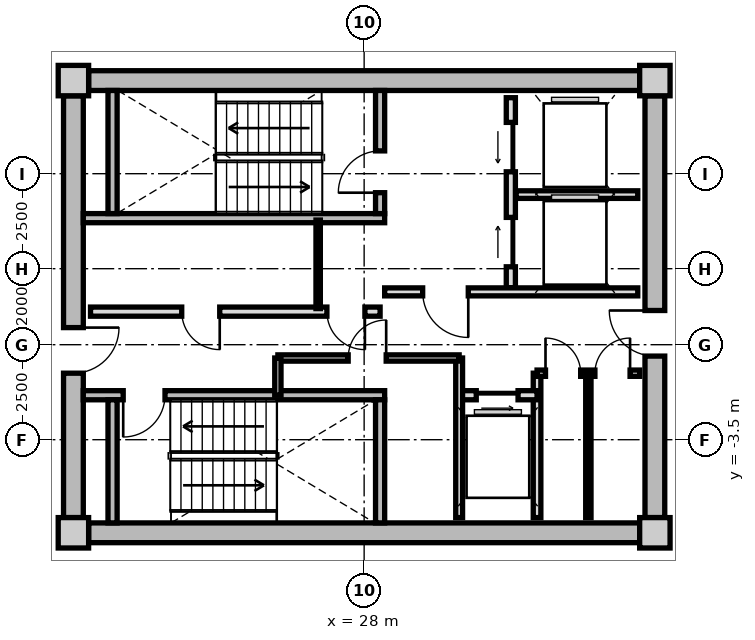
"""IFC4 building model, lengths in metres.
Left out: names, types, materials, properties, quantities, classifications, styles, units other than length and angle.
Written with IfcOpenShell. Run it as: python <this file> out.ifc"""

import sys

from ifc_helpers import new_model, si_unit, direction, frame, frame_2d, origin, origin_2d, place, context, subcontext, project, spatial, rectangle, extrude, source, transform, mapped, element, fill, save


model = new_model("IFC4")
c1 = context("Model", 3, precision=1e-05, world=origin(), true_north=direction((0.0, 1.0)))
c2 = subcontext(c1, "Body", "Model", "MODEL_VIEW")
j1 = project(units=[si_unit("LENGTHUNIT", "METRE"), si_unit("PLANEANGLEUNIT", "RADIAN")], contexts=[c1])
p1 = place(None, origin())
s1 = spatial("IfcSite", under=j1, at=p1, CompositionType="ELEMENT")
p2 = place(p1, origin())
s2 = spatial("IfcBuilding", under=s1, at=p2, CompositionType="ELEMENT")
p3 = place(p2, frame((0.0, 0.0, 203.8)))
s3 = spatial("IfcBuildingStorey", under=s2, at=p3, CompositionType="ELEMENT", Elevation=203.8)
m1 = source(origin(), c2, "Body", "SweptSolid", [
    extrude(rectangle(XDim=0.8, YDim=0.8, at=origin_2d()), origin(), (0.0, 0.0, 1.0), 4.0),
])
for number, where, z_axis, x_axis in (
    (1, (20.35, -5.95, 0.0), (0.0, 0.0, 1.0), (1.0, 0.0, 0.0)),
    (2, (35.65, -5.95, 0.0), (0.0, 0.0, 1.0), (1.0, 0.0, 0.0)),
    (3, (35.65, 5.95, 0.0), (0.0, 0.0, 1.0), (1.0, 0.0, 0.0)),
    (4, (20.35, 5.95, 0.0), (0.0, 0.0, 1.0), (1.0, 0.0, 0.0)),
):
    element("IfcColumn", number, at=place(p3, frame(where, z_axis=z_axis, x_axis=x_axis)), inside=s3, PredefinedType="COLUMN", context=c2, shape_type="MappedRepresentation", body=[
        mapped(m1, transform((0.0, 0.0, 0.0), x_axis=(1.0, 0.0, 0.0), y_axis=(0.0, 1.0, 0.0), z_axis=(0.0, 0.0, 1.0), scale=1.0)),
    ])
m2 = source(origin(), c2, "Body", "SweptSolid", [
    extrude(rectangle(XDim=14.5, YDim=0.52, at=frame_2d((7.25, 0.0))), origin(), (0.0, 0.0, 1.0), 3.71),
])
for number, where, z_axis, x_axis in (
    (5, (20.75, 5.95, 0.0), (0.0, 0.0, 1.0), (1.0, 0.0, 0.0)),
    (6, (35.25, -5.95, 0.0), (0.0, 0.0, 1.0), (-1.0, 0.0, 0.0)),
):
    element("IfcWall", number, at=place(p3, frame(where, z_axis=z_axis, x_axis=x_axis)), inside=s3, PredefinedType="SHEAR", context=c2, shape_type="MappedRepresentation", body=[
        mapped(m2, transform((0.0, 0.0, 0.0), x_axis=(1.0, 0.0, 0.0), y_axis=(0.0, 1.0, 0.0), z_axis=(0.0, 0.0, 1.0), scale=1.0)),
    ])
m3 = source(origin(), c2, "Body", "SweptSolid", [
    extrude(rectangle(XDim=11.1, YDim=0.52, at=frame_2d((5.55, 0.0))), origin(), (0.0, 0.0, 1.0), 3.71),
])
p4 = place(p3, frame((20.35, -5.55, 0.0), z_axis=(0.0, 0.0, 1.0), x_axis=(0.0, 1.0, 0.0)))
e7 = element("IfcWall", 7, at=p4, inside=s3, PredefinedType="SHEAR", context=c2, shape_type="MappedRepresentation", body=[
    mapped(m3, transform((0.0, 0.0, 0.0), x_axis=(1.0, 0.0, 0.0), y_axis=(0.0, 1.0, 0.0), z_axis=(0.0, 0.0, 1.0), scale=1.0)),
])
p5 = place(p4, frame((3.8, 0.0, 0.0)))
e8 = element("IfcOpeningElement", 8, at=p5, cuts=e7, PredefinedType="OPENING", context=c2, shape_type="SweptSolid", body=[
    extrude(rectangle(XDim=1.2, YDim=2.15, at=frame_2d((0.6, 1.075))), frame((0.0, 0.27, 0.0), z_axis=(0.0, -1.0, 0.0), x_axis=(1.0, 0.0, 0.0)), (0.0, 0.0, 1.0), 0.54),
])
p6 = place(p3, frame((35.65, 5.55, 0.0), z_axis=(0.0, 0.0, 1.0), x_axis=(0.0, -1.0, 0.0)))
e9 = element("IfcWall", 9, at=p6, inside=s3, PredefinedType="SHEAR", context=c2, shape_type="MappedRepresentation", body=[
    mapped(m3, transform((0.0, 0.0, 0.0), x_axis=(1.0, 0.0, 0.0), y_axis=(0.0, 1.0, 0.0), z_axis=(0.0, 0.0, 1.0), scale=1.0)),
])
p7 = place(p6, frame((5.65, 0.0, 0.0)))
e10 = element("IfcOpeningElement", 10, at=p7, cuts=e9, PredefinedType="OPENING", context=c2, shape_type="SweptSolid", body=[
    extrude(rectangle(XDim=1.2, YDim=2.15, at=frame_2d((0.6, 1.075))), frame((0.0, 0.27, 0.0), z_axis=(0.0, -1.0, 0.0), x_axis=(1.0, 0.0, 0.0)), (0.0, 0.0, 1.0), 0.54),
])
m4 = source(origin(), c2, "Body", "SweptSolid", [
    extrude(rectangle(XDim=7.93, YDim=0.24, at=frame_2d((3.965, 0.0))), origin(), (0.0, 0.0, 1.0), 3.71),
])
p8 = place(p3, frame((20.61, 2.33, 0.0), z_axis=(0.0, 0.0, 1.0), x_axis=(1.0, 0.0, 0.0)))
e11 = element("IfcWall", 11, at=p8, inside=s3, PredefinedType="PARTITIONING", context=c2, shape_type="MappedRepresentation", body=[
    mapped(m4, transform((0.0, 0.0, 0.0), x_axis=(1.0, 0.0, 0.0), y_axis=(0.0, 1.0, 0.0), z_axis=(0.0, 0.0, 1.0), scale=1.0)),
])
m5 = source(origin(), c2, "Body", "SweptSolid", [
    extrude(rectangle(XDim=3.24, YDim=0.24, at=frame_2d((1.62, 0.0))), origin(), (0.0, 0.0, 1.0), 3.71),
])
p9 = place(p3, frame((21.38, 2.45, 0.0), z_axis=(0.0, 0.0, 1.0), x_axis=(0.0, 1.0, 0.0)))
e12 = element("IfcWall", 12, at=p9, inside=s3, PredefinedType="PARTITIONING", context=c2, shape_type="MappedRepresentation", body=[
    mapped(m5, transform((0.0, 0.0, 0.0), x_axis=(1.0, 0.0, 0.0), y_axis=(0.0, 1.0, 0.0), z_axis=(0.0, 0.0, 1.0), scale=1.0)),
])
p10 = place(p3, frame((28.42, 2.45, 0.0), z_axis=(0.0, 0.0, 1.0), x_axis=(0.0, 1.0, 0.0)))
e13 = element("IfcWall", 13, at=p10, inside=s3, PredefinedType="PARTITIONING", context=c2, shape_type="MappedRepresentation", body=[
    mapped(m5, transform((0.0, 0.0, 0.0), x_axis=(1.0, 0.0, 0.0), y_axis=(0.0, 1.0, 0.0), z_axis=(0.0, 0.0, 1.0), scale=1.0)),
])
p11 = place(p10, frame((0.55, 0.0, 0.0)))
e14 = element("IfcOpeningElement", 14, at=p11, cuts=e13, PredefinedType="OPENING", context=c2, shape_type="SweptSolid", body=[
    extrude(rectangle(XDim=1.1, YDim=2.15, at=frame_2d((0.55, 1.075))), frame((0.0, 0.13, 0.0), z_axis=(0.0, -1.0, 0.0), x_axis=(1.0, 0.0, 0.0)), (0.0, 0.0, 1.0), 0.26),
])
p12 = place(p3, frame((20.61, -2.33, 0.0), z_axis=(0.0, 0.0, 1.0), x_axis=(1.0, 0.0, 0.0)))
e15 = element("IfcWall", 15, at=p12, inside=s3, PredefinedType="PARTITIONING", context=c2, shape_type="MappedRepresentation", body=[
    mapped(m4, transform((0.0, 0.0, 0.0), x_axis=(1.0, 0.0, 0.0), y_axis=(0.0, 1.0, 0.0), z_axis=(0.0, 0.0, 1.0), scale=1.0)),
])
p13 = place(p12, frame((1.05, 0.0, 0.0)))
e16 = element("IfcOpeningElement", 16, at=p13, cuts=e15, PredefinedType="OPENING", context=c2, shape_type="SweptSolid", body=[
    extrude(rectangle(XDim=1.1, YDim=2.15, at=frame_2d((0.55, 1.075))), frame((0.0, 0.13, 0.0), z_axis=(0.0, -1.0, 0.0), x_axis=(1.0, 0.0, 0.0)), (0.0, 0.0, 1.0), 0.26),
])
for number, where, z_axis, x_axis in (
    (17, (21.38, -5.69, 0.0), (0.0, 0.0, 1.0), (0.0, 1.0, 0.0)),
    (18, (28.42, -5.69, 0.0), (0.0, 0.0, 1.0), (0.0, 1.0, 0.0)),
):
    element("IfcWall", number, at=place(p3, frame(where, z_axis=z_axis, x_axis=x_axis)), inside=s3, PredefinedType="PARTITIONING", context=c2, shape_type="MappedRepresentation", body=[
        mapped(m5, transform((0.0, 0.0, 0.0), x_axis=(1.0, 0.0, 0.0), y_axis=(0.0, 1.0, 0.0), z_axis=(0.0, 0.0, 1.0), scale=1.0)),
    ])
m6 = source(origin(), c2, "Body", "SweptSolid", [
    extrude(rectangle(XDim=5.0, YDim=0.24, at=frame_2d((2.5, 0.0))), origin(), (0.0, 0.0, 1.0), 3.695),
])
p14 = place(p3, frame((31.86, 0.5, 0.0), z_axis=(0.0, 0.0, 1.0), x_axis=(0.0, 1.0, 0.0)))
e19 = element("IfcWall", 19, at=p14, inside=s3, PredefinedType="PARTITIONING", context=c2, shape_type="MappedRepresentation", body=[
    mapped(m6, transform((0.0, 0.0, 0.0), x_axis=(1.0, 0.0, 0.0), y_axis=(0.0, 1.0, 0.0), z_axis=(0.0, 0.0, 1.0), scale=1.0)),
])
p15 = place(p14, frame((3.05, 0.0, 0.0)))
e20 = element("IfcOpeningElement", 20, at=p15, cuts=e19, PredefinedType="OPENING", context=c2, shape_type="SweptSolid", body=[
    extrude(rectangle(XDim=1.3, YDim=2.2, at=frame_2d((0.65, 1.1))), frame((0.0, 0.13, 0.0), z_axis=(0.0, -1.0, 0.0), x_axis=(1.0, 0.0, 0.0)), (0.0, 0.0, 1.0), 0.26),
])
p16 = place(p14, frame((0.55, 0.0, 0.0)))
e21 = element("IfcOpeningElement", 21, at=p16, cuts=e19, PredefinedType="OPENING", context=c2, shape_type="SweptSolid", body=[
    extrude(rectangle(XDim=1.3, YDim=2.2, at=frame_2d((0.65, 1.1))), frame((0.0, 0.13, 0.0), z_axis=(0.0, -1.0, 0.0), x_axis=(1.0, 0.0, 0.0)), (0.0, 0.0, 1.0), 0.26),
])
m7 = source(origin(), c2, "Body", "SweptSolid", [
    extrude(rectangle(XDim=3.2, YDim=0.2, at=frame_2d((1.6, 0.0))), origin(), (0.0, 0.0, 1.0), 3.695),
])
p17 = place(p3, frame((32.0, 2.95, 0.0), z_axis=(0.0, 0.0, 1.0), x_axis=(1.0, 0.0, 0.0)))
e22 = element("IfcWall", 22, at=p17, inside=s3, PredefinedType="PARTITIONING", context=c2, shape_type="MappedRepresentation", body=[
    mapped(m7, transform((0.0, 0.0, 0.0), x_axis=(1.0, 0.0, 0.0), y_axis=(0.0, 1.0, 0.0), z_axis=(0.0, 0.0, 1.0), scale=1.0)),
])
m8 = source(origin(), c2, "Body", "SweptSolid", [
    extrude(rectangle(XDim=6.66, YDim=0.21, at=frame_2d((3.33, 0.0))), origin(), (0.0, 0.0, 1.0), 3.695),
])
p18 = place(p3, frame((28.54, 0.39, 0.0), z_axis=(0.0, 0.0, 1.0), x_axis=(1.0, 0.0, 0.0)))
e23 = element("IfcWall", 23, at=p18, inside=s3, PredefinedType="PARTITIONING", context=c2, shape_type="MappedRepresentation", body=[
    mapped(m8, transform((0.0, 0.0, 0.0), x_axis=(1.0, 0.0, 0.0), y_axis=(0.0, 1.0, 0.0), z_axis=(0.0, 0.0, 1.0), scale=1.0)),
])
p19 = place(p18, frame((1.0, 0.0, 0.0)))
e24 = element("IfcOpeningElement", 24, at=p19, cuts=e23, PredefinedType="OPENING", context=c2, shape_type="SweptSolid", body=[
    extrude(rectangle(XDim=1.2, YDim=2.15, at=frame_2d((0.6, 1.075))), frame((0.0, 0.115, 0.0), z_axis=(0.0, -1.0, 0.0), x_axis=(1.0, 0.0, 0.0)), (0.0, 0.0, 1.0), 0.23),
])
m9 = source(origin(), c2, "Body", "SweptSolid", [
    extrude(rectangle(XDim=7.62, YDim=0.24, at=frame_2d((3.81, 0.0))), origin(), (0.0, 0.0, 1.0), 3.695),
])
p20 = place(p3, frame((20.8, -0.13, 0.0), z_axis=(0.0, 0.0, 1.0), x_axis=(1.0, 0.0, 0.0)))
e25 = element("IfcWall", 25, at=p20, inside=s3, PredefinedType="PARTITIONING", context=c2, shape_type="MappedRepresentation", body=[
    mapped(m9, transform((0.0, 0.0, 0.0), x_axis=(1.0, 0.0, 0.0), y_axis=(0.0, 1.0, 0.0), z_axis=(0.0, 0.0, 1.0), scale=1.0)),
])
p21 = place(p20, frame((6.22, 0.0, 0.0)))
e26 = element("IfcOpeningElement", 26, at=p21, cuts=e25, PredefinedType="OPENING", context=c2, shape_type="SweptSolid", body=[
    extrude(rectangle(XDim=1.0, YDim=2.1, at=frame_2d((0.5, 1.05))), frame((0.0, 0.13, 0.0), z_axis=(0.0, -1.0, 0.0), x_axis=(1.0, 0.0, 0.0)), (0.0, 0.0, 1.0), 0.26),
])
p22 = place(p20, frame((2.4, 0.0, 0.0)))
e27 = element("IfcOpeningElement", 27, at=p22, cuts=e25, PredefinedType="OPENING", context=c2, shape_type="SweptSolid", body=[
    extrude(rectangle(XDim=1.0, YDim=2.1, at=frame_2d((0.5, 1.05))), frame((0.0, 0.13, 0.0), z_axis=(0.0, -1.0, 0.0), x_axis=(1.0, 0.0, 0.0)), (0.0, 0.0, 1.0), 0.26),
])
m10 = source(origin(), c2, "Body", "SweptSolid", [
    extrude(rectangle(XDim=2.33, YDim=0.115, at=frame_2d((1.165, 0.0))), origin(), (0.0, 0.0, 1.0), 3.695),
])
p23 = place(p3, frame((26.79, -0.05, 0.0), z_axis=(0.0, 0.0, 1.0), x_axis=(0.0, 1.0, 0.0)))
e28 = element("IfcWall", 28, at=p23, inside=s3, PredefinedType="PARTITIONING", context=c2, shape_type="MappedRepresentation", body=[
    mapped(m10, transform((0.0, 0.0, 0.0), x_axis=(1.0, 0.0, 0.0), y_axis=(0.0, 1.0, 0.0), z_axis=(0.0, 0.0, 1.0), scale=1.0)),
])
m11 = source(origin(), c2, "Body", "SweptSolid", [
    extrude(rectangle(XDim=3.8, YDim=0.2, at=frame_2d((1.9, 0.0))), origin(), (0.0, 0.0, 1.0), 3.695),
])
p24 = place(p3, frame((32.55, -5.55, 0.0), z_axis=(0.0, 0.0, 1.0), x_axis=(0.0, 1.0, 0.0)))
e29 = element("IfcWall", 29, at=p24, inside=s3, PredefinedType="PARTITIONING", context=c2, shape_type="MappedRepresentation", body=[
    mapped(m11, transform((0.0, 0.0, 0.0), x_axis=(1.0, 0.0, 0.0), y_axis=(0.0, 1.0, 0.0), z_axis=(0.0, 0.0, 1.0), scale=1.0)),
])
m12 = source(origin(), c2, "Body", "SweptSolid", [
    extrude(rectangle(XDim=2.05, YDim=0.24, at=frame_2d((1.025, 0.0))), origin(), (0.0, 0.0, 1.0), 3.695),
])
p25 = place(p3, frame((30.5, -2.33, 0.0), z_axis=(0.0, 0.0, 1.0), x_axis=(1.0, 0.0, 0.0)))
e30 = element("IfcWall", 30, at=p25, inside=s3, PredefinedType="PARTITIONING", context=c2, shape_type="MappedRepresentation", body=[
    mapped(m12, transform((0.0, 0.0, 0.0), x_axis=(1.0, 0.0, 0.0), y_axis=(0.0, 1.0, 0.0), z_axis=(0.0, 0.0, 1.0), scale=1.0)),
])
p26 = place(p25, frame((0.45, 0.0, 0.0)))
e31 = element("IfcOpeningElement", 31, at=p26, cuts=e30, PredefinedType="OPENING", context=c2, shape_type="SweptSolid", body=[
    extrude(rectangle(XDim=1.1, YDim=2.2, at=frame_2d((0.55, 1.1))), frame((0.0, 0.13, 0.0), z_axis=(0.0, -1.0, 0.0), x_axis=(1.0, 0.0, 0.0)), (0.0, 0.0, 1.0), 0.26),
])
m13 = source(origin(), c2, "Body", "SweptSolid", [
    extrude(rectangle(XDim=4.2, YDim=0.18, at=frame_2d((2.1, 0.0))), origin(), (0.0, 0.0, 1.0), 3.695),
])
p27 = place(p3, frame((30.5, -5.55, 0.0), z_axis=(0.0, 0.0, 1.0), x_axis=(0.0, 1.0, 0.0)))
e32 = element("IfcWall", 32, at=p27, inside=s3, PredefinedType="PARTITIONING", context=c2, shape_type="MappedRepresentation", body=[
    mapped(m13, transform((0.0, 0.0, 0.0), x_axis=(1.0, 0.0, 0.0), y_axis=(0.0, 1.0, 0.0), z_axis=(0.0, 0.0, 1.0), scale=1.0)),
])
m14 = source(origin(), c2, "Body", "SweptSolid", [
    extrude(rectangle(XDim=4.77, YDim=0.165, at=frame_2d((2.385, 0.0))), origin(), (0.0, 0.0, 1.0), 3.695),
])
p28 = place(p3, frame((25.73, -1.35, 0.0), z_axis=(0.0, 0.0, 1.0), x_axis=(1.0, 0.0, 0.0)))
e33 = element("IfcWall", 33, at=p28, inside=s3, PredefinedType="PARTITIONING", context=c2, shape_type="MappedRepresentation", body=[
    mapped(m14, transform((0.0, 0.0, 0.0), x_axis=(1.0, 0.0, 0.0), y_axis=(0.0, 1.0, 0.0), z_axis=(0.0, 0.0, 1.0), scale=1.0)),
])
p29 = place(p28, frame((1.85, 0.0, 0.0)))
e34 = element("IfcOpeningElement", 34, at=p29, cuts=e33, PredefinedType="OPENING", context=c2, shape_type="SweptSolid", body=[
    extrude(rectangle(XDim=1.0, YDim=2.1, at=frame_2d((0.5, 1.05))), frame((0.0, 0.093, 0.0), z_axis=(0.0, -1.0, 0.0), x_axis=(1.0, 0.0, 0.0)), (0.0, 0.0, 1.0), 0.185),
])
m15 = source(origin(), c2, "Body", "SweptSolid", [
    extrude(rectangle(XDim=0.98, YDim=0.165, at=frame_2d((0.49, 0.0))), origin(), (0.0, 0.0, 1.0), 3.695),
])
p30 = place(p3, frame((25.73, -2.33, 0.0), z_axis=(0.0, 0.0, 1.0), x_axis=(0.0, 1.0, 0.0)))
e35 = element("IfcWall", 35, at=p30, inside=s3, PredefinedType="PARTITIONING", context=c2, shape_type="MappedRepresentation", body=[
    mapped(m15, transform((0.0, 0.0, 0.0), x_axis=(1.0, 0.0, 0.0), y_axis=(0.0, 1.0, 0.0), z_axis=(0.0, 0.0, 1.0), scale=1.0)),
])
m16 = source(origin(), c2, "Body", "SweptSolid", [
    extrude(rectangle(XDim=2.7, YDim=0.165, at=frame_2d((1.35, 0.0))), origin(), (0.0, 0.0, 1.0), 3.695),
])
p31 = place(p3, frame((32.55, -1.75, 0.0), z_axis=(0.0, 0.0, 1.0), x_axis=(1.0, 0.0, 0.0)))
e36 = element("IfcWall", 36, at=p31, inside=s3, PredefinedType="PARTITIONING", context=c2, shape_type="MappedRepresentation", body=[
    mapped(m16, transform((0.0, 0.0, 0.0), x_axis=(1.0, 0.0, 0.0), y_axis=(0.0, 1.0, 0.0), z_axis=(0.0, 0.0, 1.0), scale=1.0)),
])
p32 = place(p31, frame((0.222, 0.0, 0.0)))
e37 = element("IfcOpeningElement", 37, at=p32, cuts=e36, PredefinedType="OPENING", context=c2, shape_type="SweptSolid", body=[
    extrude(rectangle(XDim=0.925, YDim=2.1, at=frame_2d((0.462, 1.05))), frame((0.0, 0.093, 0.0), z_axis=(0.0, -1.0, 0.0), x_axis=(1.0, 0.0, 0.0)), (0.0, 0.0, 1.0), 0.185),
])
p33 = place(p31, frame((1.522, 0.0, 0.0)))
e38 = element("IfcOpeningElement", 38, at=p33, cuts=e36, PredefinedType="OPENING", context=c2, shape_type="SweptSolid", body=[
    extrude(rectangle(XDim=0.925, YDim=2.1, at=frame_2d((0.462, 1.05))), frame((0.0, 0.093, 0.0), z_axis=(0.0, -1.0, 0.0), x_axis=(1.0, 0.0, 0.0)), (0.0, 0.0, 1.0), 0.185),
])
m17 = source(origin(), c2, "Body", "SweptSolid", [
    extrude(rectangle(XDim=3.8, YDim=0.14, at=frame_2d((1.9, 0.0))), origin(), (0.0, 0.0, 1.0), 3.695),
])
p34 = place(p3, frame((33.9, -5.55, 0.0), z_axis=(0.0, 0.0, 1.0), x_axis=(0.0, 1.0, 0.0)))
e39 = element("IfcWall", 39, at=p34, inside=s3, PredefinedType="PARTITIONING", context=c2, shape_type="MappedRepresentation", body=[
    mapped(m17, transform((0.0, 0.0, 0.0), x_axis=(1.0, 0.0, 0.0), y_axis=(0.0, 1.0, 0.0), z_axis=(0.0, 0.0, 1.0), scale=1.0)),
])
m18 = source(origin(), c2, "Body", "SweptSolid", [
    extrude(rectangle(XDim=1.1, YDim=2.15, at=frame_2d((0.55, 1.075))), frame((0.0, 0.025, 0.0), z_axis=(0.0, -1.0, 0.0), x_axis=(1.0, 0.0, 0.0)), (0.0, 0.0, 1.0), 0.05),
])
p35 = place(p11, origin())
e40 = element("IfcDoor", 40, at=p35, inside=s3, OperationType="SINGLE_SWING_LEFT", PredefinedType="DOOR", context=c2, shape_type="MappedRepresentation", body=[
    mapped(m18, transform((0.0, 0.0, 0.0), x_axis=(1.0, 0.0, 0.0), y_axis=(0.0, 1.0, 0.0), z_axis=(0.0, 0.0, 1.0), scale=1.0)),
])
fill(e14, e40)
p36 = place(p13, frame((1.1, 0.0, 0.0), z_axis=(0.0, 0.0, 1.0), x_axis=(-1.0, 0.0, 0.0)))
e41 = element("IfcDoor", 41, at=p36, inside=s3, OperationType="SINGLE_SWING_RIGHT", PredefinedType="DOOR", context=c2, shape_type="MappedRepresentation", body=[
    mapped(m18, transform((0.0, 0.0, 0.0), x_axis=(1.0, 0.0, 0.0), y_axis=(0.0, 1.0, 0.0), z_axis=(0.0, 0.0, 1.0), scale=1.0)),
])
fill(e16, e41)
m19 = source(origin(), c2, "Body", "SweptSolid", [
    extrude(rectangle(XDim=1.3, YDim=2.2, at=frame_2d((0.65, 1.1))), frame((0.0, 0.025, 0.0), z_axis=(0.0, -1.0, 0.0), x_axis=(1.0, 0.0, 0.0)), (0.0, 0.0, 1.0), 0.05),
])
p37 = place(p15, origin())
e42 = element("IfcDoor", 42, at=p37, inside=s3, OperationType="SLIDING_TO_LEFT", PredefinedType="DOOR", context=c2, shape_type="MappedRepresentation", body=[
    mapped(m19, transform((0.0, 0.0, 0.0), x_axis=(1.0, 0.0, 0.0), y_axis=(0.0, 1.0, 0.0), z_axis=(0.0, 0.0, 1.0), scale=1.0)),
])
fill(e20, e42)
p38 = place(p16, origin())
e43 = element("IfcDoor", 43, at=p38, inside=s3, OperationType="SLIDING_TO_RIGHT", PredefinedType="DOOR", context=c2, shape_type="MappedRepresentation", body=[
    mapped(m19, transform((0.0, 0.0, 0.0), x_axis=(1.0, 0.0, 0.0), y_axis=(0.0, 1.0, 0.0), z_axis=(0.0, 0.0, 1.0), scale=1.0)),
])
fill(e21, e43)
m20 = source(origin(), c2, "Body", "SweptSolid", [
    extrude(rectangle(XDim=1.2, YDim=2.15, at=frame_2d((0.6, 1.075))), frame((0.0, 0.025, 0.0), z_axis=(0.0, -1.0, 0.0), x_axis=(1.0, 0.0, 0.0)), (0.0, 0.0, 1.0), 0.05),
])
p39 = place(p19, frame((1.2, 0.0, 0.0), z_axis=(0.0, 0.0, 1.0), x_axis=(-1.0, 0.0, 0.0)))
e44 = element("IfcDoor", 44, at=p39, inside=s3, OperationType="SINGLE_SWING_LEFT", PredefinedType="DOOR", context=c2, shape_type="MappedRepresentation", body=[
    mapped(m20, transform((0.0, 0.0, 0.0), x_axis=(1.0, 0.0, 0.0), y_axis=(0.0, 1.0, 0.0), z_axis=(0.0, 0.0, 1.0), scale=1.0)),
])
fill(e24, e44)
p40 = place(p5, frame((1.2, 0.0, 0.0), z_axis=(0.0, 0.0, 1.0), x_axis=(-1.0, 0.0, 0.0)))
e45 = element("IfcDoor", 45, at=p40, inside=s3, OperationType="SINGLE_SWING_LEFT", PredefinedType="DOOR", context=c2, shape_type="MappedRepresentation", body=[
    mapped(m20, transform((0.0, 0.0, 0.0), x_axis=(1.0, 0.0, 0.0), y_axis=(0.0, 1.0, 0.0), z_axis=(0.0, 0.0, 1.0), scale=1.0)),
])
fill(e8, e45)
p41 = place(p7, frame((1.2, 0.0, 0.0), z_axis=(0.0, 0.0, 1.0), x_axis=(-1.0, 0.0, 0.0)))
e46 = element("IfcDoor", 46, at=p41, inside=s3, OperationType="SINGLE_SWING_RIGHT", PredefinedType="DOOR", context=c2, shape_type="MappedRepresentation", body=[
    mapped(m20, transform((0.0, 0.0, 0.0), x_axis=(1.0, 0.0, 0.0), y_axis=(0.0, 1.0, 0.0), z_axis=(0.0, 0.0, 1.0), scale=1.0)),
])
fill(e10, e46)
m21 = source(origin(), c2, "Body", "SweptSolid", [
    extrude(rectangle(XDim=1.0, YDim=2.1, at=frame_2d((0.5, 1.05))), frame((0.0, 0.025, 0.0), z_axis=(0.0, -1.0, 0.0), x_axis=(1.0, 0.0, 0.0)), (0.0, 0.0, 1.0), 0.05),
])
p42 = place(p21, frame((1.0, 0.0, 0.0), z_axis=(0.0, 0.0, 1.0), x_axis=(-1.0, 0.0, 0.0)))
e47 = element("IfcDoor", 47, at=p42, inside=s3, OperationType="SINGLE_SWING_LEFT", PredefinedType="DOOR", context=c2, shape_type="MappedRepresentation", body=[
    mapped(m21, transform((0.0, 0.0, 0.0), x_axis=(1.0, 0.0, 0.0), y_axis=(0.0, 1.0, 0.0), z_axis=(0.0, 0.0, 1.0), scale=1.0)),
])
fill(e26, e47)
p43 = place(p22, frame((1.0, 0.0, 0.0), z_axis=(0.0, 0.0, 1.0), x_axis=(-1.0, 0.0, 0.0)))
e48 = element("IfcDoor", 48, at=p43, inside=s3, OperationType="SINGLE_SWING_LEFT", PredefinedType="DOOR", context=c2, shape_type="MappedRepresentation", body=[
    mapped(m21, transform((0.0, 0.0, 0.0), x_axis=(1.0, 0.0, 0.0), y_axis=(0.0, 1.0, 0.0), z_axis=(0.0, 0.0, 1.0), scale=1.0)),
])
fill(e27, e48)
m22 = source(origin(), c2, "Body", "SweptSolid", [
    extrude(rectangle(XDim=1.1, YDim=2.2, at=frame_2d((0.55, 1.1))), frame((0.0, 0.025, 0.0), z_axis=(0.0, -1.0, 0.0), x_axis=(1.0, 0.0, 0.0)), (0.0, 0.0, 1.0), 0.05),
])
p44 = place(p26, frame((1.1, 0.0, 0.0), z_axis=(0.0, 0.0, 1.0), x_axis=(-1.0, 0.0, 0.0)))
e49 = element("IfcDoor", 49, at=p44, inside=s3, OperationType="SLIDING_TO_RIGHT", PredefinedType="DOOR", context=c2, shape_type="MappedRepresentation", body=[
    mapped(m22, transform((0.0, 0.0, 0.0), x_axis=(1.0, 0.0, 0.0), y_axis=(0.0, 1.0, 0.0), z_axis=(0.0, 0.0, 1.0), scale=1.0)),
])
fill(e31, e49)
p45 = place(p29, origin())
e50 = element("IfcDoor", 50, at=p45, inside=s3, OperationType="SINGLE_SWING_RIGHT", PredefinedType="DOOR", context=c2, shape_type="MappedRepresentation", body=[
    mapped(m21, transform((0.0, 0.0, 0.0), x_axis=(1.0, 0.0, 0.0), y_axis=(0.0, 1.0, 0.0), z_axis=(0.0, 0.0, 1.0), scale=1.0)),
])
fill(e34, e50)
m23 = source(origin(), c2, "Body", "SweptSolid", [
    extrude(rectangle(XDim=0.925, YDim=2.1, at=frame_2d((0.462, 1.05))), frame((0.0, 0.025, 0.0), z_axis=(0.0, -1.0, 0.0), x_axis=(1.0, 0.0, 0.0)), (0.0, 0.0, 1.0), 0.05),
])
p46 = place(p32, origin())
e51 = element("IfcDoor", 51, at=p46, inside=s3, OperationType="SINGLE_SWING_LEFT", PredefinedType="DOOR", context=c2, shape_type="MappedRepresentation", body=[
    mapped(m23, transform((0.0, 0.0, 0.0), x_axis=(1.0, 0.0, 0.0), y_axis=(0.0, 1.0, 0.0), z_axis=(0.0, 0.0, 1.0), scale=1.0)),
])
fill(e37, e51)
p47 = place(p33, origin())
e52 = element("IfcDoor", 52, at=p47, inside=s3, OperationType="SINGLE_SWING_RIGHT", PredefinedType="DOOR", context=c2, shape_type="MappedRepresentation", body=[
    mapped(m23, transform((0.0, 0.0, 0.0), x_axis=(1.0, 0.0, 0.0), y_axis=(0.0, 1.0, 0.0), z_axis=(0.0, 0.0, 1.0), scale=1.0)),
])
fill(e38, e52)
save(model, sys.argv[1])
